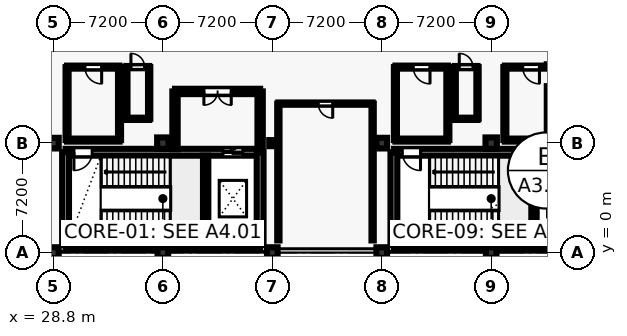
"""IFC4 building model, lengths in metres.
Left out: names, types, materials, properties, quantities, classifications, styles, units other than length and angle.
Written with IfcOpenShell. Run it as: python <this file> out.ifc"""

import sys

from ifc_helpers import new_model, si_unit, direction, frame, frame_2d, origin, origin_2d, place, context, subcontext, project, spatial, rectangle, hollow_rectangle, extrude, element, fill, save


model = new_model("IFC4")
c1 = context("Model", 3, precision=1e-05, world=origin(), true_north=direction((0.0, 1.0)))
c2 = subcontext(c1, "Body", "Model", "MODEL_VIEW")
j1 = project(units=[si_unit("LENGTHUNIT", "METRE"), si_unit("PLANEANGLEUNIT", "RADIAN")], contexts=[c1])
p1 = place(None, origin())
s1 = spatial("IfcSite", under=j1, at=p1, CompositionType="ELEMENT")
p2 = place(p1, origin())
s2 = spatial("IfcBuilding", under=s1, at=p2, CompositionType="ELEMENT")
p3 = place(p2, frame((0.0, 0.0, 9.6)))
s3 = spatial("IfcBuildingStorey", under=s2, at=p3, CompositionType="ELEMENT", Elevation=9.6)
for number, where, z_axis, x_axis in (
    (1, (28.8, 0.0, 0.0), (0.0, 0.0, 1.0), (1.0, 0.0, 0.0)),
    (2, (28.8, 7.2, 0.0), (0.0, 0.0, 1.0), (1.0, 0.0, 0.0)),
    (3, (36.0, 0.0, 0.0), (0.0, 0.0, 1.0), (1.0, 0.0, 0.0)),
):
    element("IfcColumn", number, at=place(p3, frame(where, z_axis=z_axis, x_axis=x_axis)), inside=s3, PredefinedType="COLUMN", context=c2, shape_type="SweptSolid", body=[
        extrude(rectangle(XDim=0.7, YDim=0.7, at=origin_2d()), origin(), (0.0, 0.0, 1.0), 4.2),
    ])
p4 = place(p3, frame((36.0, 7.2, 0.0), z_axis=(0.0, 0.0, 1.0), x_axis=(1.0, 0.0, 0.0)))
e4 = element("IfcColumn", 4, at=p4, inside=s3, PredefinedType="COLUMN", context=c2, shape_type="SweptSolid", body=[
    extrude(rectangle(XDim=0.75, YDim=0.75, at=origin_2d()), origin(), (0.0, 0.0, 1.0), 4.2),
])
p5 = place(p3, frame((43.2, 0.0, 0.0), z_axis=(0.0, 0.0, 1.0), x_axis=(1.0, 0.0, 0.0)))
e5 = element("IfcColumn", 5, at=p5, inside=s3, PredefinedType="COLUMN", context=c2, shape_type="SweptSolid", body=[
    extrude(rectangle(XDim=0.7, YDim=0.7, at=origin_2d()), origin(), (0.0, 0.0, 1.0), 4.2),
])
p6 = place(p3, frame((43.2, 7.2, 0.0), z_axis=(0.0, 0.0, 1.0), x_axis=(1.0, 0.0, 0.0)))
e6 = element("IfcColumn", 6, at=p6, inside=s3, PredefinedType="COLUMN", context=c2, shape_type="SweptSolid", body=[
    extrude(hollow_rectangle(XDim=0.4, YDim=0.4, WallThickness=0.02, at=origin_2d()), origin(), (0.0, 0.0, 1.0), 4.2),
])
for number, where, z_axis, x_axis in (
    (7, (50.4, 0.0, 0.0), (0.0, 0.0, 1.0), (1.0, 0.0, 0.0)),
    (8, (50.4, 7.2, 0.0), (0.0, 0.0, 1.0), (1.0, 0.0, 0.0)),
    (9, (57.6, 0.0, 0.0), (0.0, 0.0, 1.0), (1.0, 0.0, 0.0)),
):
    element("IfcColumn", number, at=place(p3, frame(where, z_axis=z_axis, x_axis=x_axis)), inside=s3, PredefinedType="COLUMN", context=c2, shape_type="SweptSolid", body=[
        extrude(rectangle(XDim=0.7, YDim=0.7, at=origin_2d()), origin(), (0.0, 0.0, 1.0), 4.2),
    ])
p7 = place(p3, frame((57.6, 7.2, 0.0), z_axis=(0.0, 0.0, 1.0), x_axis=(1.0, 0.0, 0.0)))
e10 = element("IfcColumn", 10, at=p7, inside=s3, PredefinedType="COLUMN", context=c2, shape_type="SweptSolid", body=[
    extrude(rectangle(XDim=0.75, YDim=0.75, at=origin_2d()), origin(), (0.0, 0.0, 1.0), 4.2),
])
p8 = place(p3, frame((29.6, 0.5, 0.0), z_axis=(0.0, 0.0, 1.0), x_axis=(1.0, 0.0, 0.0)))
e11 = element("IfcWall", 11, at=p8, inside=s3, PredefinedType="SHEAR", context=c2, shape_type="SweptSolid", body=[
    extrude(rectangle(XDim=12.8, YDim=0.45, at=frame_2d((6.4, 0.0))), origin(), (0.0, 0.0, 1.0), 3.88),
])
p9 = place(p3, frame((29.6, 6.6, 0.0), z_axis=(0.0, 0.0, 1.0), x_axis=(1.0, 0.0, 0.0)))
e12 = element("IfcWall", 12, at=p9, inside=s3, PredefinedType="SHEAR", context=c2, shape_type="SweptSolid", body=[
    extrude(rectangle(XDim=12.8, YDim=0.45, at=frame_2d((6.4, 0.0))), origin(), (0.0, 0.0, 1.0), 3.88),
])
p10 = place(p9, frame((0.55, 0.0, 0.0)))
e13 = element("IfcOpeningElement", 13, at=p10, cuts=e12, PredefinedType="OPENING", context=c2, shape_type="SweptSolid", body=[
    extrude(rectangle(XDim=1.2, YDim=2.25, at=frame_2d((0.6, 1.125))), frame((0.0, 0.235, 0.0), z_axis=(0.0, -1.0, 0.0), x_axis=(1.0, 0.0, 0.0)), (0.0, 0.0, 1.0), 0.47),
])
p11 = place(p9, frame((10.358, 0.0, 0.0)))
e14 = element("IfcOpeningElement", 14, at=p11, cuts=e12, PredefinedType="OPENING", context=c2, shape_type="SweptSolid", body=[
    extrude(rectangle(XDim=1.3, YDim=2.25, at=frame_2d((0.65, 1.125))), frame((0.0, 0.235, 0.0), z_axis=(0.0, -1.0, 0.0), x_axis=(1.0, 0.0, 0.0)), (0.0, 0.0, 1.0), 0.47),
])
for number, where, z_axis, x_axis in (
    (15, (29.6, 0.5, 0.0), (0.0, 0.0, 1.0), (0.0, 1.0, 0.0)),
    (16, (42.4, 0.5, 0.0), (0.0, 0.0, 1.0), (0.0, 1.0, 0.0)),
):
    element("IfcWall", number, at=place(p3, frame(where, z_axis=z_axis, x_axis=x_axis)), inside=s3, PredefinedType="SHEAR", context=c2, shape_type="SweptSolid", body=[
        extrude(rectangle(XDim=6.1, YDim=0.45, at=frame_2d((3.05, 0.0))), origin(), (0.0, 0.0, 1.0), 3.88),
    ])
p12 = place(p3, frame((38.816, 0.725, 0.0), z_axis=(0.0, 0.0, 1.0), x_axis=(0.0, 1.0, 0.0)))
e17 = element("IfcWall", 17, at=p12, inside=s3, PredefinedType="SHEAR", context=c2, shape_type="SweptSolid", body=[
    extrude(rectangle(XDim=5.65, YDim=0.35, at=frame_2d((2.825, 0.0))), origin(), (0.0, 0.0, 1.0), 3.88),
])
p13 = place(p3, frame((51.2, 0.5, 0.0), z_axis=(0.0, 0.0, 1.0), x_axis=(1.0, 0.0, 0.0)))
e18 = element("IfcWall", 18, at=p13, inside=s3, PredefinedType="SHEAR", context=c2, shape_type="SweptSolid", body=[
    extrude(rectangle(XDim=12.8, YDim=0.45, at=frame_2d((6.4, 0.0))), origin(), (0.0, 0.0, 1.0), 3.88),
])
p14 = place(p3, frame((51.2, 6.6, 0.0), z_axis=(0.0, 0.0, 1.0), x_axis=(1.0, 0.0, 0.0)))
e19 = element("IfcWall", 19, at=p14, inside=s3, PredefinedType="SHEAR", context=c2, shape_type="SweptSolid", body=[
    extrude(rectangle(XDim=12.8, YDim=0.45, at=frame_2d((6.4, 0.0))), origin(), (0.0, 0.0, 1.0), 3.88),
])
p15 = place(p14, frame((0.55, 0.0, 0.0)))
e20 = element("IfcOpeningElement", 20, at=p15, cuts=e19, PredefinedType="OPENING", context=c2, shape_type="SweptSolid", body=[
    extrude(rectangle(XDim=1.2, YDim=2.25, at=frame_2d((0.6, 1.125))), frame((0.0, 0.235, 0.0), z_axis=(0.0, -1.0, 0.0), x_axis=(1.0, 0.0, 0.0)), (0.0, 0.0, 1.0), 0.47),
])
p16 = place(p14, frame((10.458, 0.0, 0.0)))
e21 = element("IfcOpeningElement", 21, at=p16, cuts=e19, PredefinedType="OPENING", context=c2, shape_type="SweptSolid", body=[
    extrude(rectangle(XDim=1.1, YDim=2.2, at=frame_2d((0.55, 1.1))), frame((0.0, 0.235, 0.0), z_axis=(0.0, -1.0, 0.0), x_axis=(1.0, 0.0, 0.0)), (0.0, 0.0, 1.0), 0.47),
])
p17 = place(p3, frame((51.2, 0.5, 0.0), z_axis=(0.0, 0.0, 1.0), x_axis=(0.0, 1.0, 0.0)))
e22 = element("IfcWall", 22, at=p17, inside=s3, PredefinedType="SHEAR", context=c2, shape_type="SweptSolid", body=[
    extrude(rectangle(XDim=6.1, YDim=0.45, at=frame_2d((3.05, 0.0))), origin(), (0.0, 0.0, 1.0), 3.88),
])
p18 = place(p3, frame((60.416, 0.725, 0.0), z_axis=(0.0, 0.0, 1.0), x_axis=(0.0, 1.0, 0.0)))
e23 = element("IfcWall", 23, at=p18, inside=s3, PredefinedType="SHEAR", context=c2, shape_type="SweptSolid", body=[
    extrude(rectangle(XDim=5.65, YDim=0.35, at=frame_2d((2.825, 0.0))), origin(), (0.0, 0.0, 1.0), 3.88),
])
p19 = place(p3, frame((42.4, 6.8, 0.0), z_axis=(0.0, 0.0, 1.0), x_axis=(0.0, 1.0, 0.0)))
e24 = element("IfcWall", 24, at=p19, inside=s3, PredefinedType="SHEAR", context=c2, shape_type="SweptSolid", body=[
    extrude(rectangle(XDim=3.8, YDim=0.35, at=frame_2d((1.9, 0.0))), origin(), (0.0, 0.0, 1.0), 2.94),
])
p20 = place(p3, frame((42.4, 10.6, 0.0), z_axis=(0.0, 0.0, 1.0), x_axis=(-1.0, 0.0, 0.0)))
e25 = element("IfcWall", 25, at=p20, inside=s3, PredefinedType="SHEAR", context=c2, shape_type="SweptSolid", body=[
    extrude(rectangle(XDim=5.6, YDim=0.35, at=frame_2d((2.8, 0.0))), origin(), (0.0, 0.0, 1.0), 2.94),
])
p21 = place(p20, frame((1.9, 0.0, 0.0)))
e26 = element("IfcOpeningElement", 26, at=p21, cuts=e25, PredefinedType="OPENING", context=c2, shape_type="SweptSolid", body=[
    extrude(rectangle(XDim=1.8, YDim=2.3, at=frame_2d((0.9, 1.15))), frame((0.0, 0.185, 0.0), z_axis=(0.0, -1.0, 0.0), x_axis=(1.0, 0.0, 0.0)), (0.0, 0.0, 1.0), 0.37),
])
p22 = place(p3, frame((36.8, 10.6, 0.0), z_axis=(0.0, 0.0, 1.0), x_axis=(0.0, -1.0, 0.0)))
e27 = element("IfcWall", 27, at=p22, inside=s3, PredefinedType="SHEAR", context=c2, shape_type="SweptSolid", body=[
    extrude(rectangle(XDim=3.8, YDim=0.35, at=frame_2d((1.9, 0.0))), origin(), (0.0, 0.0, 1.0), 2.94),
])
p23 = place(p3, frame((49.8, 0.8, 0.0), z_axis=(0.0, 0.0, 1.0), x_axis=(0.0, 1.0, 0.0)))
e28 = element("IfcWall", 28, at=p23, inside=s3, PredefinedType="PARTITIONING", context=c2, shape_type="SweptSolid", body=[
    extrude(rectangle(XDim=9.0, YDim=0.15, at=frame_2d((4.5, 0.0))), origin(), (0.0, 0.0, 1.0), 2.94),
])
p24 = place(p3, frame((49.8, 9.8, 0.0), z_axis=(0.0, 0.0, 1.0), x_axis=(-1.0, 0.0, 0.0)))
e29 = element("IfcWall", 29, at=p24, inside=s3, PredefinedType="PARTITIONING", context=c2, shape_type="SweptSolid", body=[
    extrude(rectangle(XDim=6.2, YDim=0.15, at=frame_2d((3.1, 0.0))), origin(), (0.0, 0.0, 1.0), 2.94),
])
p25 = place(p24, frame((2.625, 0.0, 0.0)))
e30 = element("IfcOpeningElement", 30, at=p25, cuts=e29, PredefinedType="OPENING", context=c2, shape_type="SweptSolid", body=[
    extrude(rectangle(XDim=0.95, YDim=2.15, at=frame_2d((0.475, 1.075))), frame((0.0, 0.085, 0.0), z_axis=(0.0, -1.0, 0.0), x_axis=(1.0, 0.0, 0.0)), (0.0, 0.0, 1.0), 0.17),
])
p26 = place(p3, frame((43.6, 9.8, 0.0), z_axis=(0.0, 0.0, 1.0), x_axis=(0.0, -1.0, 0.0)))
e31 = element("IfcWall", 31, at=p26, inside=s3, PredefinedType="PARTITIONING", context=c2, shape_type="SweptSolid", body=[
    extrude(rectangle(XDim=9.0, YDim=0.15, at=frame_2d((4.5, 0.0))), origin(), (0.0, 0.0, 1.0), 2.94),
])
p27 = place(p3, frame((29.7, 7.4, 0.0), z_axis=(0.0, 0.0, 1.0), x_axis=(1.0, 0.0, 0.0)))
e32 = element("IfcWall", 32, at=p27, inside=s3, PredefinedType="PARTITIONING", context=c2, shape_type="SweptSolid", body=[
    extrude(rectangle(XDim=3.45, YDim=0.2, at=frame_2d((1.725, 0.0))), origin(), (0.0, 0.0, 1.0), 2.94),
])
p28 = place(p3, frame((33.15, 7.4, 0.0), z_axis=(0.0, 0.0, 1.0), x_axis=(0.0, 1.0, 0.0)))
e33 = element("IfcWall", 33, at=p28, inside=s3, PredefinedType="PARTITIONING", context=c2, shape_type="SweptSolid", body=[
    extrude(rectangle(XDim=4.8, YDim=0.2, at=frame_2d((2.4, 0.0))), origin(), (0.0, 0.0, 1.0), 2.94),
])
p29 = place(p3, frame((33.15, 12.2, 0.0), z_axis=(0.0, 0.0, 1.0), x_axis=(-1.0, 0.0, 0.0)))
e34 = element("IfcWall", 34, at=p29, inside=s3, PredefinedType="PARTITIONING", context=c2, shape_type="SweptSolid", body=[
    extrude(rectangle(XDim=3.45, YDim=0.2, at=frame_2d((1.725, 0.0))), origin(), (0.0, 0.0, 1.0), 2.94),
])
p30 = place(p29, frame((1.175, 0.0, 0.0)))
e35 = element("IfcOpeningElement", 35, at=p30, cuts=e34, PredefinedType="OPENING", context=c2, shape_type="SweptSolid", body=[
    extrude(rectangle(XDim=1.1, YDim=2.25, at=frame_2d((0.55, 1.125))), frame((0.0, 0.11, 0.0), z_axis=(0.0, -1.0, 0.0), x_axis=(1.0, 0.0, 0.0)), (0.0, 0.0, 1.0), 0.22),
])
p31 = place(p3, frame((29.7, 12.2, 0.0), z_axis=(0.0, 0.0, 1.0), x_axis=(0.0, -1.0, 0.0)))
e36 = element("IfcWall", 36, at=p31, inside=s3, PredefinedType="PARTITIONING", context=c2, shape_type="SweptSolid", body=[
    extrude(rectangle(XDim=4.8, YDim=0.2, at=frame_2d((2.4, 0.0))), origin(), (0.0, 0.0, 1.0), 2.94),
])
p32 = place(p3, frame((33.6, 8.8, 0.0), z_axis=(0.0, 0.0, 1.0), x_axis=(1.0, 0.0, 0.0)))
e37 = element("IfcWall", 37, at=p32, inside=s3, PredefinedType="PARTITIONING", context=c2, shape_type="SweptSolid", body=[
    extrude(rectangle(XDim=1.5, YDim=0.15, at=frame_2d((0.75, 0.0))), origin(), (0.0, 0.0, 1.0), 2.94),
])
p33 = place(p3, frame((35.1, 8.8, 0.0), z_axis=(0.0, 0.0, 1.0), x_axis=(0.0, 1.0, 0.0)))
e38 = element("IfcWall", 38, at=p33, inside=s3, PredefinedType="PARTITIONING", context=c2, shape_type="SweptSolid", body=[
    extrude(rectangle(XDim=3.4, YDim=0.15, at=frame_2d((1.7, 0.0))), origin(), (0.0, 0.0, 1.0), 2.94),
])
p34 = place(p3, frame((35.1, 12.2, 0.0), z_axis=(0.0, 0.0, 1.0), x_axis=(-1.0, 0.0, 0.0)))
e39 = element("IfcWall", 39, at=p34, inside=s3, PredefinedType="PARTITIONING", context=c2, shape_type="SweptSolid", body=[
    extrude(rectangle(XDim=1.5, YDim=0.15, at=frame_2d((0.75, 0.0))), origin(), (0.0, 0.0, 1.0), 2.94),
])
p35 = place(p34, frame((0.3, 0.0, 0.0)))
e40 = element("IfcOpeningElement", 40, at=p35, cuts=e39, PredefinedType="OPENING", context=c2, shape_type="SweptSolid", body=[
    extrude(rectangle(XDim=0.9, YDim=2.15, at=frame_2d((0.45, 1.075))), frame((0.0, 0.085, 0.0), z_axis=(0.0, -1.0, 0.0), x_axis=(1.0, 0.0, 0.0)), (0.0, 0.0, 1.0), 0.17),
])
p36 = place(p3, frame((33.6, 12.2, 0.0), z_axis=(0.0, 0.0, 1.0), x_axis=(0.0, -1.0, 0.0)))
e41 = element("IfcWall", 41, at=p36, inside=s3, PredefinedType="PARTITIONING", context=c2, shape_type="SweptSolid", body=[
    extrude(rectangle(XDim=3.4, YDim=0.15, at=frame_2d((1.7, 0.0))), origin(), (0.0, 0.0, 1.0), 2.94),
])
p37 = place(p3, frame((51.3, 7.4, 0.0), z_axis=(0.0, 0.0, 1.0), x_axis=(1.0, 0.0, 0.0)))
e42 = element("IfcWall", 42, at=p37, inside=s3, PredefinedType="PARTITIONING", context=c2, shape_type="SweptSolid", body=[
    extrude(rectangle(XDim=3.45, YDim=0.2, at=frame_2d((1.725, 0.0))), origin(), (0.0, 0.0, 1.0), 2.94),
])
p38 = place(p3, frame((54.75, 7.4, 0.0), z_axis=(0.0, 0.0, 1.0), x_axis=(0.0, 1.0, 0.0)))
e43 = element("IfcWall", 43, at=p38, inside=s3, PredefinedType="PARTITIONING", context=c2, shape_type="SweptSolid", body=[
    extrude(rectangle(XDim=4.8, YDim=0.2, at=frame_2d((2.4, 0.0))), origin(), (0.0, 0.0, 1.0), 2.94),
])
p39 = place(p3, frame((54.75, 12.2, 0.0), z_axis=(0.0, 0.0, 1.0), x_axis=(-1.0, 0.0, 0.0)))
e44 = element("IfcWall", 44, at=p39, inside=s3, PredefinedType="PARTITIONING", context=c2, shape_type="SweptSolid", body=[
    extrude(rectangle(XDim=3.45, YDim=0.2, at=frame_2d((1.725, 0.0))), origin(), (0.0, 0.0, 1.0), 2.94),
])
p40 = place(p39, frame((1.175, 0.0, 0.0)))
e45 = element("IfcOpeningElement", 45, at=p40, cuts=e44, PredefinedType="OPENING", context=c2, shape_type="SweptSolid", body=[
    extrude(rectangle(XDim=1.1, YDim=2.25, at=frame_2d((0.55, 1.125))), frame((0.0, 0.11, 0.0), z_axis=(0.0, -1.0, 0.0), x_axis=(1.0, 0.0, 0.0)), (0.0, 0.0, 1.0), 0.22),
])
p41 = place(p3, frame((51.3, 12.2, 0.0), z_axis=(0.0, 0.0, 1.0), x_axis=(0.0, -1.0, 0.0)))
e46 = element("IfcWall", 46, at=p41, inside=s3, PredefinedType="PARTITIONING", context=c2, shape_type="SweptSolid", body=[
    extrude(rectangle(XDim=4.8, YDim=0.2, at=frame_2d((2.4, 0.0))), origin(), (0.0, 0.0, 1.0), 2.94),
])
p42 = place(p3, frame((55.2, 8.8, 0.0), z_axis=(0.0, 0.0, 1.0), x_axis=(1.0, 0.0, 0.0)))
e47 = element("IfcWall", 47, at=p42, inside=s3, PredefinedType="PARTITIONING", context=c2, shape_type="SweptSolid", body=[
    extrude(rectangle(XDim=1.5, YDim=0.15, at=frame_2d((0.75, 0.0))), origin(), (0.0, 0.0, 1.0), 2.94),
])
p43 = place(p3, frame((56.7, 8.8, 0.0), z_axis=(0.0, 0.0, 1.0), x_axis=(0.0, 1.0, 0.0)))
e48 = element("IfcWall", 48, at=p43, inside=s3, PredefinedType="PARTITIONING", context=c2, shape_type="SweptSolid", body=[
    extrude(rectangle(XDim=3.4, YDim=0.15, at=frame_2d((1.7, 0.0))), origin(), (0.0, 0.0, 1.0), 2.94),
])
p44 = place(p3, frame((56.7, 12.2, 0.0), z_axis=(0.0, 0.0, 1.0), x_axis=(-1.0, 0.0, 0.0)))
e49 = element("IfcWall", 49, at=p44, inside=s3, PredefinedType="PARTITIONING", context=c2, shape_type="SweptSolid", body=[
    extrude(rectangle(XDim=1.5, YDim=0.15, at=frame_2d((0.75, 0.0))), origin(), (0.0, 0.0, 1.0), 2.94),
])
p45 = place(p44, frame((0.3, 0.0, 0.0)))
e50 = element("IfcOpeningElement", 50, at=p45, cuts=e49, PredefinedType="OPENING", context=c2, shape_type="SweptSolid", body=[
    extrude(rectangle(XDim=0.9, YDim=2.15, at=frame_2d((0.45, 1.075))), frame((0.0, 0.085, 0.0), z_axis=(0.0, -1.0, 0.0), x_axis=(1.0, 0.0, 0.0)), (0.0, 0.0, 1.0), 0.17),
])
p46 = place(p3, frame((55.2, 12.2, 0.0), z_axis=(0.0, 0.0, 1.0), x_axis=(0.0, -1.0, 0.0)))
e51 = element("IfcWall", 51, at=p46, inside=s3, PredefinedType="PARTITIONING", context=c2, shape_type="SweptSolid", body=[
    extrude(rectangle(XDim=3.4, YDim=0.15, at=frame_2d((1.7, 0.0))), origin(), (0.0, 0.0, 1.0), 2.94),
])
p47 = place(p3, frame((58.5, 7.4, 0.0), z_axis=(0.0, 0.0, 1.0), x_axis=(1.0, 0.0, 0.0)))
e52 = element("IfcWall", 52, at=p47, inside=s3, PredefinedType="PARTITIONING", context=c2, shape_type="SweptSolid", body=[
    extrude(rectangle(XDim=3.45, YDim=0.2, at=frame_2d((1.725, 0.0))), origin(), (0.0, 0.0, 1.0), 2.94),
])
p48 = place(p3, frame((61.95, 12.2, 0.0), z_axis=(0.0, 0.0, 1.0), x_axis=(-1.0, 0.0, 0.0)))
e53 = element("IfcWall", 53, at=p48, inside=s3, PredefinedType="PARTITIONING", context=c2, shape_type="SweptSolid", body=[
    extrude(rectangle(XDim=3.45, YDim=0.2, at=frame_2d((1.725, 0.0))), origin(), (0.0, 0.0, 1.0), 2.94),
])
p49 = place(p48, frame((1.175, 0.0, 0.0)))
e54 = element("IfcOpeningElement", 54, at=p49, cuts=e53, PredefinedType="OPENING", context=c2, shape_type="SweptSolid", body=[
    extrude(rectangle(XDim=1.1, YDim=2.25, at=frame_2d((0.55, 1.125))), frame((0.0, 0.11, 0.0), z_axis=(0.0, -1.0, 0.0), x_axis=(1.0, 0.0, 0.0)), (0.0, 0.0, 1.0), 0.22),
])
p50 = place(p3, frame((58.5, 12.2, 0.0), z_axis=(0.0, 0.0, 1.0), x_axis=(0.0, -1.0, 0.0)))
e55 = element("IfcWall", 55, at=p50, inside=s3, PredefinedType="PARTITIONING", context=c2, shape_type="SweptSolid", body=[
    extrude(rectangle(XDim=4.8, YDim=0.2, at=frame_2d((2.4, 0.0))), origin(), (0.0, 0.0, 1.0), 2.94),
])
p51 = place(p10, frame((1.2, 0.0, 0.0), z_axis=(0.0, 0.0, 1.0), x_axis=(-1.0, 0.0, 0.0)))
e56 = element("IfcDoor", 56, at=p51, inside=s3, OperationType="SINGLE_SWING_LEFT", PredefinedType="DOOR", context=c2, shape_type="SweptSolid", body=[
    extrude(rectangle(XDim=1.2, YDim=2.25, at=frame_2d((0.6, 1.125))), frame((0.0, 0.025, 0.0), z_axis=(0.0, -1.0, 0.0), x_axis=(1.0, 0.0, 0.0)), (0.0, 0.0, 1.0), 0.05),
])
fill(e13, e56)
p52 = place(p11, origin())
e57 = element("IfcDoor", 57, at=p52, inside=s3, OperationType="SLIDING_TO_RIGHT", PredefinedType="DOOR", context=c2, shape_type="SweptSolid", body=[
    extrude(rectangle(XDim=1.3, YDim=2.25, at=frame_2d((0.65, 1.125))), frame((0.0, 0.025, 0.0), z_axis=(0.0, -1.0, 0.0), x_axis=(1.0, 0.0, 0.0)), (0.0, 0.0, 1.0), 0.05),
])
fill(e14, e57)
p53 = place(p15, frame((1.2, 0.0, 0.0), z_axis=(0.0, 0.0, 1.0), x_axis=(-1.0, 0.0, 0.0)))
e58 = element("IfcDoor", 58, at=p53, inside=s3, OperationType="SINGLE_SWING_RIGHT", PredefinedType="DOOR", context=c2, shape_type="SweptSolid", body=[
    extrude(rectangle(XDim=1.2, YDim=2.25, at=frame_2d((0.6, 1.125))), frame((0.0, 0.025, 0.0), z_axis=(0.0, -1.0, 0.0), x_axis=(1.0, 0.0, 0.0)), (0.0, 0.0, 1.0), 0.05),
])
fill(e20, e58)
p54 = place(p21, origin())
e59 = element("IfcDoor", 59, at=p54, inside=s3, OperationType="DOUBLE_DOOR_SINGLE_SWING", PredefinedType="DOOR", context=c2, shape_type="SweptSolid", body=[
    extrude(rectangle(XDim=1.8, YDim=2.3, at=frame_2d((0.9, 1.15))), frame((0.0, 0.025, 0.0), z_axis=(0.0, -1.0, 0.0), x_axis=(1.0, 0.0, 0.0)), (0.0, 0.0, 1.0), 0.05),
])
fill(e26, e59)
p55 = place(p25, origin())
e60 = element("IfcDoor", 60, at=p55, inside=s3, OperationType="SINGLE_SWING_LEFT", PredefinedType="DOOR", context=c2, shape_type="SweptSolid", body=[
    extrude(rectangle(XDim=0.95, YDim=2.15, at=frame_2d((0.475, 1.075))), frame((0.0, 0.025, 0.0), z_axis=(0.0, -1.0, 0.0), x_axis=(1.0, 0.0, 0.0)), (0.0, 0.0, 1.0), 0.05),
])
fill(e30, e60)
p56 = place(p30, origin())
e61 = element("IfcDoor", 61, at=p56, inside=s3, OperationType="SINGLE_SWING_LEFT", PredefinedType="DOOR", context=c2, shape_type="SweptSolid", body=[
    extrude(rectangle(XDim=1.1, YDim=2.25, at=frame_2d((0.55, 1.125))), frame((0.0, 0.025, 0.0), z_axis=(0.0, -1.0, 0.0), x_axis=(1.0, 0.0, 0.0)), (0.0, 0.0, 1.0), 0.05),
])
fill(e35, e61)
p57 = place(p35, frame((0.9, 0.0, 0.0), z_axis=(0.0, 0.0, 1.0), x_axis=(-1.0, 0.0, 0.0)))
e62 = element("IfcDoor", 62, at=p57, inside=s3, OperationType="SINGLE_SWING_RIGHT", PredefinedType="DOOR", context=c2, shape_type="SweptSolid", body=[
    extrude(rectangle(XDim=0.9, YDim=2.15, at=frame_2d((0.45, 1.075))), frame((0.0, 0.025, 0.0), z_axis=(0.0, -1.0, 0.0), x_axis=(1.0, 0.0, 0.0)), (0.0, 0.0, 1.0), 0.05),
])
fill(e40, e62)
p58 = place(p40, origin())
e63 = element("IfcDoor", 63, at=p58, inside=s3, OperationType="SINGLE_SWING_LEFT", PredefinedType="DOOR", context=c2, shape_type="SweptSolid", body=[
    extrude(rectangle(XDim=1.1, YDim=2.25, at=frame_2d((0.55, 1.125))), frame((0.0, 0.025, 0.0), z_axis=(0.0, -1.0, 0.0), x_axis=(1.0, 0.0, 0.0)), (0.0, 0.0, 1.0), 0.05),
])
fill(e45, e63)
p59 = place(p45, frame((0.9, 0.0, 0.0), z_axis=(0.0, 0.0, 1.0), x_axis=(-1.0, 0.0, 0.0)))
e64 = element("IfcDoor", 64, at=p59, inside=s3, OperationType="SINGLE_SWING_RIGHT", PredefinedType="DOOR", context=c2, shape_type="SweptSolid", body=[
    extrude(rectangle(XDim=0.9, YDim=2.15, at=frame_2d((0.45, 1.075))), frame((0.0, 0.025, 0.0), z_axis=(0.0, -1.0, 0.0), x_axis=(1.0, 0.0, 0.0)), (0.0, 0.0, 1.0), 0.05),
])
fill(e50, e64)
p60 = place(p49, origin())
e65 = element("IfcDoor", 65, at=p60, inside=s3, OperationType="SINGLE_SWING_LEFT", PredefinedType="DOOR", context=c2, shape_type="SweptSolid", body=[
    extrude(rectangle(XDim=1.1, YDim=2.25, at=frame_2d((0.55, 1.125))), frame((0.0, 0.025, 0.0), z_axis=(0.0, -1.0, 0.0), x_axis=(1.0, 0.0, 0.0)), (0.0, 0.0, 1.0), 0.05),
])
fill(e54, e65)
save(model, sys.argv[1])
